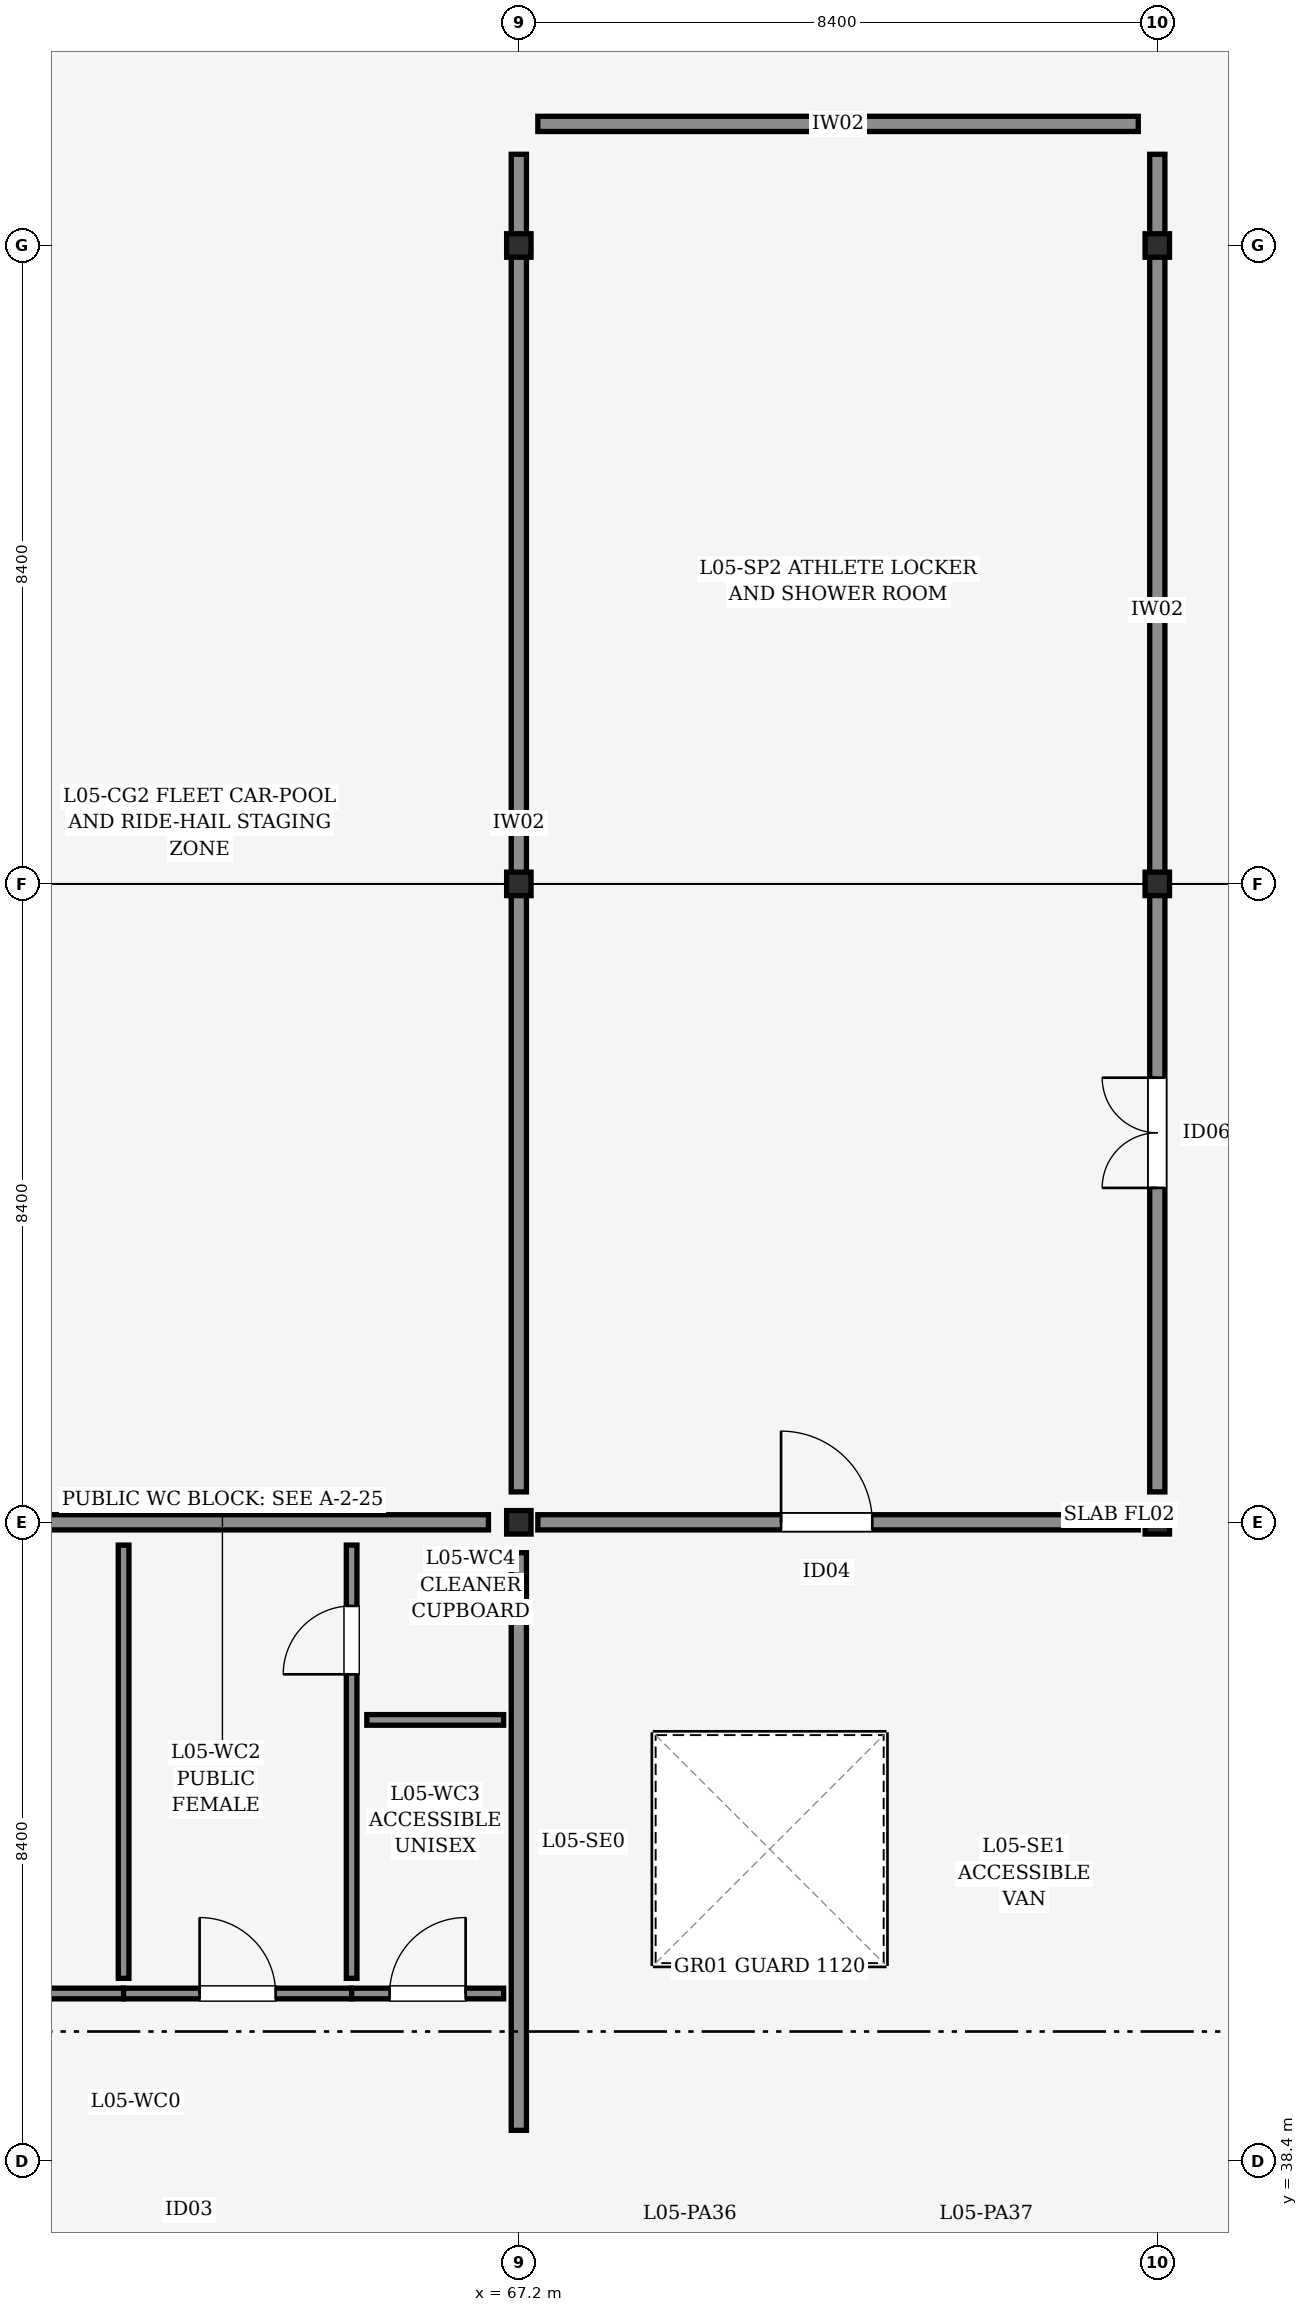
"""IFC4 building model, lengths in metres.
Left out: names, types, materials, properties, quantities, classifications, styles, units other than length and angle.
Written with IfcOpenShell. Run it as: python <this file> out.ifc"""

import sys

from ifc_helpers import new_model, si_unit, direction, frame, frame_2d, origin, origin_2d, place, context, subcontext, project, spatial, rectangle, i_section, extrude, element, fill, save


model = new_model("IFC4")
c1 = context("Model", 3, precision=1e-05, world=origin(), true_north=direction((0.0, 1.0)))
c2 = subcontext(c1, "Body", "Model", "MODEL_VIEW")
j1 = project(units=[si_unit("LENGTHUNIT", "METRE"), si_unit("PLANEANGLEUNIT", "RADIAN")], contexts=[c1])
p1 = place(None, origin())
s1 = spatial("IfcSite", under=j1, at=p1, CompositionType="ELEMENT")
p2 = place(p1, origin())
s2 = spatial("IfcBuilding", under=s1, at=p2, CompositionType="ELEMENT")
p3 = place(p2, frame((0.0, 0.0, 19.8)))
s3 = spatial("IfcBuildingStorey", under=s2, at=p3, CompositionType="ELEMENT", Elevation=19.8)
for number, where, z_axis, x_axis in (
    (1, (67.2, 38.4, 0.0), (0.0, 0.0, 1.0), (1.0, 0.0, 0.0)),
    (2, (67.2, 46.8, 0.0), (0.0, 0.0, 1.0), (1.0, 0.0, 0.0)),
    (3, (67.2, 55.2, 0.0), (0.0, 0.0, 1.0), (1.0, 0.0, 0.0)),
    (4, (67.2, 63.6, 0.0), (0.0, 0.0, 1.0), (1.0, 0.0, 0.0)),
    (5, (75.6, 38.4, 0.0), (0.0, 0.0, 1.0), (1.0, 0.0, 0.0)),
    (6, (75.6, 46.8, 0.0), (0.0, 0.0, 1.0), (1.0, 0.0, 0.0)),
    (7, (75.6, 55.2, 0.0), (0.0, 0.0, 1.0), (1.0, 0.0, 0.0)),
    (8, (75.6, 63.6, 0.0), (0.0, 0.0, 1.0), (1.0, 0.0, 0.0)),
):
    element("IfcColumn", number, at=place(p3, frame(where, z_axis=z_axis, x_axis=x_axis)), inside=s3, PredefinedType="COLUMN", context=c2, shape_type="SweptSolid", body=[
        extrude(i_section(OverallWidth=0.309, OverallDepth=0.321, WebThickness=0.014, FlangeThickness=0.022, FilletRadius=0.015, at=origin_2d()), origin(), (0.0, 0.0, 1.0), 3.6),
    ])
p4 = place(p3, frame((59.2, 38.4, 0.0), z_axis=(0.0, 0.0, 1.0), x_axis=(1.0, 0.0, 0.0)))
e9 = element("IfcWall", 9, at=p4, inside=s3, PredefinedType="PARTITIONING", context=c2, shape_type="SweptSolid", body=[
    extrude(rectangle(XDim=7.6, YDim=0.2, at=frame_2d((3.8, 0.0))), origin(), (0.0, 0.0, 1.0), 2.425),
])
p5 = place(p4, frame((3.2, 0.0, 0.0)))
e10 = element("IfcOpeningElement", 10, at=p5, cuts=e9, PredefinedType="OPENING", context=c2, shape_type="SweptSolid", body=[
    extrude(rectangle(XDim=0.92, YDim=2.1, at=frame_2d((0.46, 1.05))), frame((0.0, 0.11, 0.0), z_axis=(0.0, -1.0, 0.0), x_axis=(1.0, 0.0, 0.0)), (0.0, 0.0, 1.0), 0.22),
])
p6 = place(p3, frame((59.2, 46.8, 0.0), z_axis=(0.0, 0.0, 1.0), x_axis=(1.0, 0.0, 0.0)))
e11 = element("IfcWall", 11, at=p6, inside=s3, PredefinedType="PARTITIONING", context=c2, shape_type="SweptSolid", body=[
    extrude(rectangle(XDim=7.6, YDim=0.2, at=frame_2d((3.8, 0.0))), origin(), (0.0, 0.0, 1.0), 2.425),
])
p7 = place(p3, frame((67.2, 38.8, 0.0), z_axis=(0.0, 0.0, 1.0), x_axis=(0.0, 1.0, 0.0)))
e12 = element("IfcWall", 12, at=p7, inside=s3, PredefinedType="PARTITIONING", context=c2, shape_type="SweptSolid", body=[
    extrude(rectangle(XDim=7.6, YDim=0.2, at=frame_2d((3.8, 0.0))), origin(), (0.0, 0.0, 1.0), 2.425),
])
p8 = place(p3, frame((59.0, 40.6, 0.0), z_axis=(0.0, 0.0, 1.0), x_axis=(1.0, 0.0, 0.0)))
e13 = element("IfcWall", 13, at=p8, inside=s3, PredefinedType="PARTITIONING", context=c2, shape_type="SweptSolid", body=[
    extrude(rectangle(XDim=3.0, YDim=0.14, at=frame_2d((1.5, 0.0))), origin(), (0.0, 0.0, 1.0), 2.425),
])
p9 = place(p8, frame((1.0, 0.0, 0.0)))
e14 = element("IfcOpeningElement", 14, at=p9, cuts=e13, PredefinedType="OPENING", context=c2, shape_type="SweptSolid", body=[
    extrude(rectangle(XDim=1.0, YDim=2.1, at=frame_2d((0.5, 1.05))), frame((0.0, 0.08, 0.0), z_axis=(0.0, -1.0, 0.0), x_axis=(1.0, 0.0, 0.0)), (0.0, 0.0, 1.0), 0.16),
])
p10 = place(p3, frame((62.0, 40.6, 0.0), z_axis=(0.0, 0.0, 1.0), x_axis=(1.0, 0.0, 0.0)))
e15 = element("IfcWall", 15, at=p10, inside=s3, PredefinedType="PARTITIONING", context=c2, shape_type="SweptSolid", body=[
    extrude(rectangle(XDim=3.0, YDim=0.14, at=frame_2d((1.5, 0.0))), origin(), (0.0, 0.0, 1.0), 2.425),
])
p11 = place(p10, frame((1.0, 0.0, 0.0)))
e16 = element("IfcOpeningElement", 16, at=p11, cuts=e15, PredefinedType="OPENING", context=c2, shape_type="SweptSolid", body=[
    extrude(rectangle(XDim=1.0, YDim=2.1, at=frame_2d((0.5, 1.05))), frame((0.0, 0.08, 0.0), z_axis=(0.0, -1.0, 0.0), x_axis=(1.0, 0.0, 0.0)), (0.0, 0.0, 1.0), 0.16),
])
p12 = place(p3, frame((65.0, 40.6, 0.0), z_axis=(0.0, 0.0, 1.0), x_axis=(1.0, 0.0, 0.0)))
e17 = element("IfcWall", 17, at=p12, inside=s3, PredefinedType="PARTITIONING", context=c2, shape_type="SweptSolid", body=[
    extrude(rectangle(XDim=2.0, YDim=0.14, at=frame_2d((1.0, 0.0))), origin(), (0.0, 0.0, 1.0), 2.425),
])
p13 = place(p12, frame((0.5, 0.0, 0.0)))
e18 = element("IfcOpeningElement", 18, at=p13, cuts=e17, PredefinedType="OPENING", context=c2, shape_type="SweptSolid", body=[
    extrude(rectangle(XDim=1.0, YDim=2.1, at=frame_2d((0.5, 1.05))), frame((0.0, 0.08, 0.0), z_axis=(0.0, -1.0, 0.0), x_axis=(1.0, 0.0, 0.0)), (0.0, 0.0, 1.0), 0.16),
])
p14 = place(p3, frame((62.0, 40.8, 0.0), z_axis=(0.0, 0.0, 1.0), x_axis=(0.0, 1.0, 0.0)))
e19 = element("IfcWall", 19, at=p14, inside=s3, PredefinedType="PARTITIONING", context=c2, shape_type="SweptSolid", body=[
    extrude(rectangle(XDim=5.7, YDim=0.14, at=frame_2d((2.85, 0.0))), origin(), (0.0, 0.0, 1.0), 2.425),
])
p15 = place(p3, frame((65.0, 40.8, 0.0), z_axis=(0.0, 0.0, 1.0), x_axis=(0.0, 1.0, 0.0)))
e20 = element("IfcWall", 20, at=p15, inside=s3, PredefinedType="PARTITIONING", context=c2, shape_type="SweptSolid", body=[
    extrude(rectangle(XDim=5.7, YDim=0.14, at=frame_2d((2.85, 0.0))), origin(), (0.0, 0.0, 1.0), 2.425),
])
p16 = place(p15, frame((4.0, 0.0, 0.0)))
e21 = element("IfcOpeningElement", 21, at=p16, cuts=e20, PredefinedType="OPENING", context=c2, shape_type="SweptSolid", body=[
    extrude(rectangle(XDim=0.9, YDim=2.05, at=frame_2d((0.45, 1.025))), frame((0.0, 0.08, 0.0), z_axis=(0.0, -1.0, 0.0), x_axis=(1.0, 0.0, 0.0)), (0.0, 0.0, 1.0), 0.16),
])
p17 = place(p3, frame((65.2, 44.2, 0.0), z_axis=(0.0, 0.0, 1.0), x_axis=(1.0, 0.0, 0.0)))
e22 = element("IfcWall", 22, at=p17, inside=s3, PredefinedType="PARTITIONING", context=c2, shape_type="SweptSolid", body=[
    extrude(rectangle(XDim=1.8, YDim=0.14, at=frame_2d((0.9, 0.0))), origin(), (0.0, 0.0, 1.0), 2.425),
])
p18 = place(p3, frame((75.6, 47.2, 0.0), z_axis=(0.0, 0.0, 1.0), x_axis=(0.0, 1.0, 0.0)))
e23 = element("IfcWall", 23, at=p18, inside=s3, PredefinedType="PARTITIONING", context=c2, shape_type="SweptSolid", body=[
    extrude(rectangle(XDim=17.6, YDim=0.2, at=frame_2d((8.8, 0.0))), origin(), (0.0, 0.0, 1.0), 2.425),
])
p19 = place(p18, frame((4.0, 0.0, 0.0)))
e24 = element("IfcOpeningElement", 24, at=p19, cuts=e23, PredefinedType="OPENING", context=c2, shape_type="SweptSolid", body=[
    extrude(rectangle(XDim=1.45, YDim=2.2, at=frame_2d((0.725, 1.1))), frame((0.0, 0.11, 0.0), z_axis=(0.0, -1.0, 0.0), x_axis=(1.0, 0.0, 0.0)), (0.0, 0.0, 1.0), 0.22),
])
p20 = place(p3, frame((67.2, 47.2, 0.0), z_axis=(0.0, 0.0, 1.0), x_axis=(0.0, 1.0, 0.0)))
e25 = element("IfcWall", 25, at=p20, inside=s3, PredefinedType="PARTITIONING", context=c2, shape_type="SweptSolid", body=[
    extrude(rectangle(XDim=17.6, YDim=0.2, at=frame_2d((8.8, 0.0))), origin(), (0.0, 0.0, 1.0), 2.425),
])
p21 = place(p3, frame((67.45, 65.2, 0.0), z_axis=(0.0, 0.0, 1.0), x_axis=(1.0, 0.0, 0.0)))
e26 = element("IfcWall", 26, at=p21, inside=s3, PredefinedType="PARTITIONING", context=c2, shape_type="SweptSolid", body=[
    extrude(rectangle(XDim=7.9, YDim=0.2, at=frame_2d((3.95, 0.0))), origin(), (0.0, 0.0, 1.0), 2.425),
])
p22 = place(p3, frame((67.45, 46.8, 0.0), z_axis=(0.0, 0.0, 1.0), x_axis=(1.0, 0.0, 0.0)))
e27 = element("IfcWall", 27, at=p22, inside=s3, PredefinedType="PARTITIONING", context=c2, shape_type="SweptSolid", body=[
    extrude(rectangle(XDim=7.9, YDim=0.2, at=frame_2d((3.95, 0.0))), origin(), (0.0, 0.0, 1.0), 2.425),
])
p23 = place(p22, frame((3.2, 0.0, 0.0)))
e28 = element("IfcOpeningElement", 28, at=p23, cuts=e27, PredefinedType="OPENING", context=c2, shape_type="SweptSolid", body=[
    extrude(rectangle(XDim=1.2, YDim=2.15, at=frame_2d((0.6, 1.075))), frame((0.0, 0.11, 0.0), z_axis=(0.0, -1.0, 0.0), x_axis=(1.0, 0.0, 0.0)), (0.0, 0.0, 1.0), 0.22),
])
p24 = place(p5, origin())
e29 = element("IfcDoor", 29, at=p24, inside=s3, OperationType="SINGLE_SWING_LEFT", PredefinedType="DOOR", context=c2, shape_type="SweptSolid", body=[
    extrude(rectangle(XDim=0.92, YDim=2.1, at=frame_2d((0.46, 1.05))), frame((0.0, 0.025, 0.0), z_axis=(0.0, -1.0, 0.0), x_axis=(1.0, 0.0, 0.0)), (0.0, 0.0, 1.0), 0.05),
])
fill(e10, e29)
p25 = place(p11, origin())
e30 = element("IfcDoor", 30, at=p25, inside=s3, OperationType="SINGLE_SWING_LEFT", PredefinedType="DOOR", context=c2, shape_type="SweptSolid", body=[
    extrude(rectangle(XDim=1.0, YDim=2.1, at=frame_2d((0.5, 1.05))), frame((0.0, 0.025, 0.0), z_axis=(0.0, -1.0, 0.0), x_axis=(1.0, 0.0, 0.0)), (0.0, 0.0, 1.0), 0.05),
])
fill(e16, e30)
p26 = place(p13, origin())
e31 = element("IfcDoor", 31, at=p26, inside=s3, OperationType="SINGLE_SWING_RIGHT", PredefinedType="DOOR", context=c2, shape_type="SweptSolid", body=[
    extrude(rectangle(XDim=1.0, YDim=2.1, at=frame_2d((0.5, 1.05))), frame((0.0, 0.025, 0.0), z_axis=(0.0, -1.0, 0.0), x_axis=(1.0, 0.0, 0.0)), (0.0, 0.0, 1.0), 0.05),
])
fill(e18, e31)
p27 = place(p16, origin())
e32 = element("IfcDoor", 32, at=p27, inside=s3, OperationType="SINGLE_SWING_LEFT", PredefinedType="DOOR", context=c2, shape_type="SweptSolid", body=[
    extrude(rectangle(XDim=0.9, YDim=2.05, at=frame_2d((0.45, 1.025))), frame((0.0, 0.025, 0.0), z_axis=(0.0, -1.0, 0.0), x_axis=(1.0, 0.0, 0.0)), (0.0, 0.0, 1.0), 0.05),
])
fill(e21, e32)
p28 = place(p19, origin())
e33 = element("IfcDoor", 33, at=p28, inside=s3, OperationType="DOUBLE_DOOR_SINGLE_SWING", PredefinedType="DOOR", context=c2, shape_type="SweptSolid", body=[
    extrude(rectangle(XDim=1.45, YDim=2.2, at=frame_2d((0.725, 1.1))), frame((0.0, 0.025, 0.0), z_axis=(0.0, -1.0, 0.0), x_axis=(1.0, 0.0, 0.0)), (0.0, 0.0, 1.0), 0.05),
])
fill(e24, e33)
p29 = place(p23, origin())
e34 = element("IfcDoor", 34, at=p29, inside=s3, OperationType="SINGLE_SWING_LEFT", PredefinedType="DOOR", context=c2, shape_type="SweptSolid", body=[
    extrude(rectangle(XDim=1.2, YDim=2.15, at=frame_2d((0.6, 1.075))), frame((0.0, 0.025, 0.0), z_axis=(0.0, -1.0, 0.0), x_axis=(1.0, 0.0, 0.0)), (0.0, 0.0, 1.0), 0.05),
])
fill(e28, e34)
save(model, sys.argv[1])
